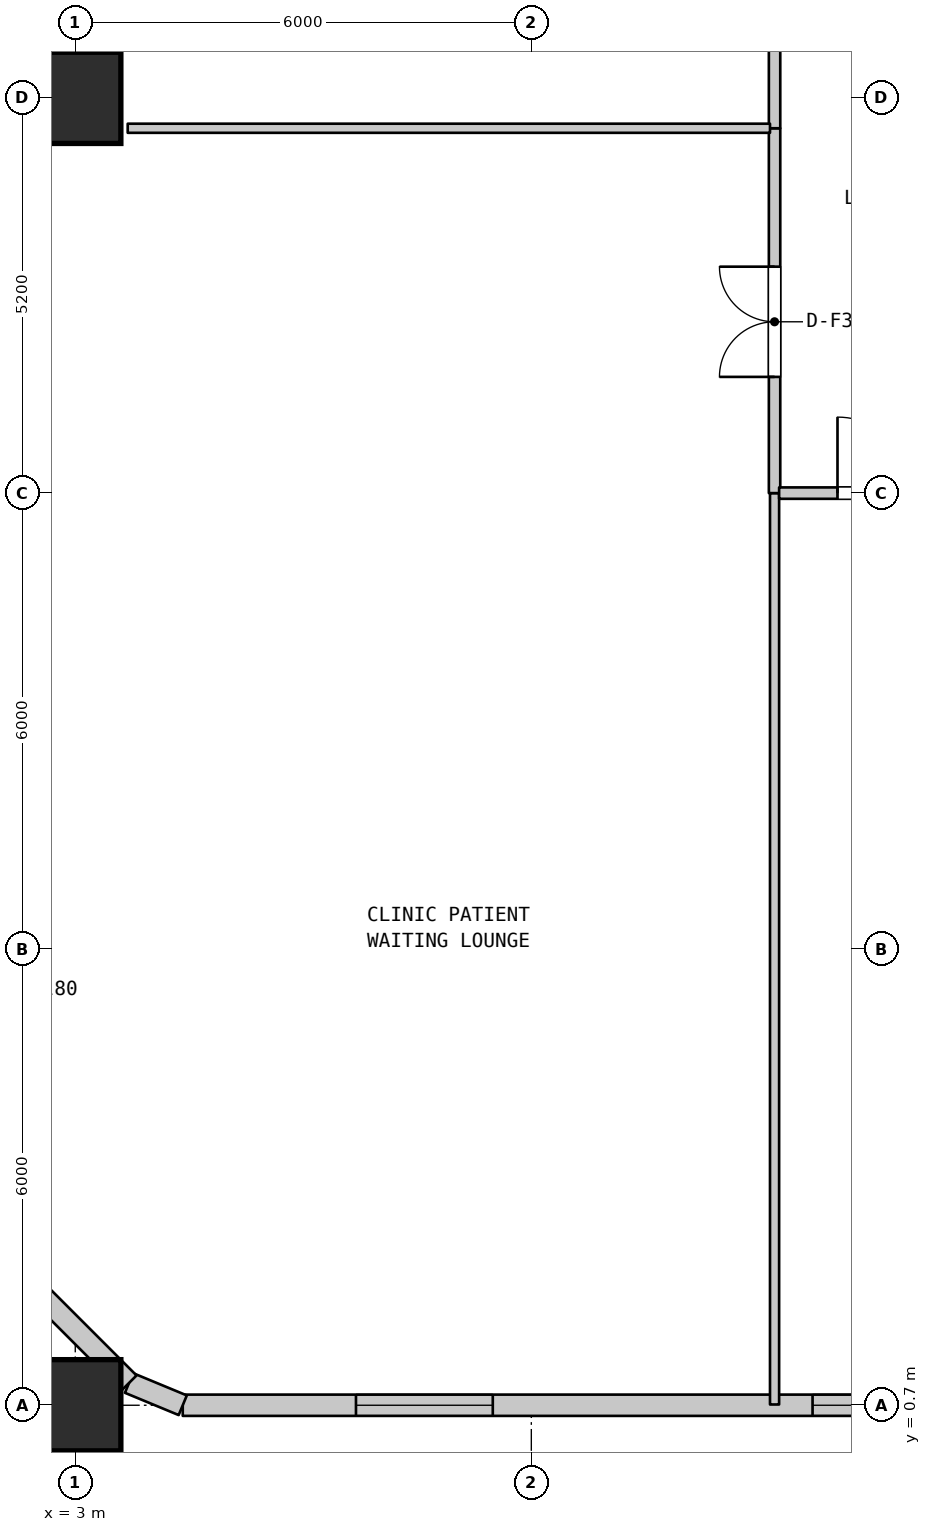
"""IFC4 building model, lengths in metres.
Left out: names, types, materials, properties, quantities, classifications, styles, units other than length and angle.
Written with IfcOpenShell. Run it as: python <this file> out.ifc"""

import sys

from ifc_helpers import new_model, si_unit, direction, frame, frame_2d, origin, origin_2d, place, context, subcontext, project, spatial, rectangle, extrude, element, fill, save


model = new_model("IFC4")
c1 = context("Model", 3, precision=1e-05, world=origin(), true_north=direction((0.0, 1.0)))
c2 = subcontext(c1, "Body", "Model", "MODEL_VIEW")
j1 = project(units=[si_unit("LENGTHUNIT", "METRE"), si_unit("PLANEANGLEUNIT", "RADIAN")], contexts=[c1])
p1 = place(None, origin())
s1 = spatial("IfcSite", under=j1, at=p1, CompositionType="ELEMENT")
p2 = place(p1, origin())
s2 = spatial("IfcBuilding", under=s1, at=p2, CompositionType="ELEMENT")
p3 = place(p2, frame((0.0, 0.0, 6.5)))
s3 = spatial("IfcBuildingStorey", under=s2, at=p3, CompositionType="ELEMENT", Elevation=6.5)
for number, where, z_axis, x_axis in (
    (1, (3.0, 0.7, 0.0), (0.0, 0.0, 1.0), (1.0, 0.0, 0.0)),
    (2, (3.0, 17.9, 0.0), (0.0, 0.0, 1.0), (1.0, 0.0, 0.0)),
):
    element("IfcColumn", number, at=place(p3, frame(where, z_axis=z_axis, x_axis=x_axis)), inside=s3, PredefinedType="PILASTER", context=c2, shape_type="SweptSolid", body=[
        extrude(rectangle(XDim=1.2, YDim=1.2, at=origin_2d()), origin(), (0.0, 0.0, 1.0), 6.5),
    ])
p4 = place(p3, frame((33.0, 0.7, 0.0), z_axis=(0.0, 0.0, 1.0), x_axis=(-1.0, 0.0, 0.0)))
e3 = element("IfcWall", 3, at=p4, inside=s3, PredefinedType="STANDARD", context=c2, shape_type="SweptSolid", body=[
    extrude(rectangle(XDim=28.586, YDim=0.28, at=frame_2d((14.293, 0.0))), origin(), (0.0, 0.0, 1.0), 6.17),
])
p5 = place(p4, frame((2.279, 0.0, 0.95)))
e4 = element("IfcOpeningElement", 4, at=p5, cuts=e3, PredefinedType="OPENING", context=c2, shape_type="SweptSolid", body=[
    extrude(rectangle(XDim=1.8, YDim=1.8, at=frame_2d((0.9, 0.9))), frame((0.0, 0.15, 0.0), z_axis=(0.0, -1.0, 0.0), x_axis=(1.0, 0.0, 0.0)), (0.0, 0.0, 1.0), 0.3),
])
p6 = place(p4, frame((7.836, 0.0, 0.95)))
e5 = element("IfcOpeningElement", 5, at=p6, cuts=e3, PredefinedType="OPENING", context=c2, shape_type="SweptSolid", body=[
    extrude(rectangle(XDim=1.8, YDim=1.8, at=frame_2d((0.9, 0.9))), frame((0.0, 0.15, 0.0), z_axis=(0.0, -1.0, 0.0), x_axis=(1.0, 0.0, 0.0)), (0.0, 0.0, 1.0), 0.3),
])
p7 = place(p4, frame((13.393, 0.0, 0.95)))
e6 = element("IfcOpeningElement", 6, at=p7, cuts=e3, PredefinedType="OPENING", context=c2, shape_type="SweptSolid", body=[
    extrude(rectangle(XDim=1.8, YDim=1.8, at=frame_2d((0.9, 0.9))), frame((0.0, 0.15, 0.0), z_axis=(0.0, -1.0, 0.0), x_axis=(1.0, 0.0, 0.0)), (0.0, 0.0, 1.0), 0.3),
])
p8 = place(p4, frame((18.5, 0.0, 0.95)))
e7 = element("IfcOpeningElement", 7, at=p8, cuts=e3, PredefinedType="OPENING", context=c2, shape_type="SweptSolid", body=[
    extrude(rectangle(XDim=1.8, YDim=1.8, at=frame_2d((0.9, 0.9))), frame((0.0, 0.15, 0.0), z_axis=(0.0, -1.0, 0.0), x_axis=(1.0, 0.0, 0.0)), (0.0, 0.0, 1.0), 0.3),
])
p9 = place(p4, frame((24.507, 0.0, 0.95)))
e8 = element("IfcOpeningElement", 8, at=p9, cuts=e3, PredefinedType="OPENING", context=c2, shape_type="SweptSolid", body=[
    extrude(rectangle(XDim=1.8, YDim=1.8, at=frame_2d((0.9, 0.9))), frame((0.0, 0.15, 0.0), z_axis=(0.0, -1.0, 0.0), x_axis=(1.0, 0.0, 0.0)), (0.0, 0.0, 1.0), 0.3),
])
p10 = place(p3, frame((4.414, 0.7, 0.0), z_axis=(0.0, 0.0, 1.0), x_axis=(-0.92383017907, 0.382802560388, 0.0)))
e9 = element("IfcWall", 9, at=p10, inside=s3, PredefinedType="STANDARD", context=c2, shape_type="SweptSolid", body=[
    extrude(rectangle(XDim=0.765, YDim=0.28, at=frame_2d((0.383, 0.0))), origin(), (0.0, 0.0, 1.0), 6.17),
])
p11 = place(p3, frame((3.707, 0.993, 0.0), z_axis=(0.0, 0.0, 1.0), x_axis=(-0.707106781187, 0.707106781187, 0.0)))
e10 = element("IfcWall", 10, at=p11, inside=s3, PredefinedType="STANDARD", context=c2, shape_type="SweptSolid", body=[
    extrude(rectangle(XDim=2.0, YDim=0.28, at=frame_2d((1.0, 0.0))), origin(), (0.0, 0.0, 1.0), 6.17),
])
p12 = place(p3, frame((12.2, 0.71, 0.0), z_axis=(0.0, 0.0, 1.0), x_axis=(0.0, 1.0, 0.0)))
e11 = element("IfcWall", 11, at=p12, inside=s3, PredefinedType="PARTITIONING", context=c2, shape_type="SweptSolid", body=[
    extrude(rectangle(XDim=11.99, YDim=0.12, at=frame_2d((5.995, 0.0))), origin(), (0.0, 0.0, 1.0), 6.17),
])
p13 = place(p3, frame((12.2, 12.7, 0.0), z_axis=(0.0, 0.0, 1.0), x_axis=(0.0, 1.0, 0.0)))
e12 = element("IfcWall", 12, at=p13, inside=s3, PredefinedType="STANDARD", context=c2, shape_type="SweptSolid", body=[
    extrude(rectangle(XDim=4.8, YDim=0.15, at=frame_2d((2.4, 0.0))), origin(), (0.0, 0.0, 1.0), 6.17),
])
p14 = place(p13, frame((1.529, 0.0, 0.0)))
e13 = element("IfcOpeningElement", 13, at=p14, cuts=e12, PredefinedType="OPENING", context=c2, shape_type="SweptSolid", body=[
    extrude(rectangle(XDim=1.45, YDim=2.2, at=frame_2d((0.725, 1.1))), frame((0.0, 0.085, 0.0), z_axis=(0.0, -1.0, 0.0), x_axis=(1.0, 0.0, 0.0)), (0.0, 0.0, 1.0), 0.17),
])
p15 = place(p3, frame((12.2, 17.5, 0.0), z_axis=(0.0, 0.0, 1.0), x_axis=(0.0, 1.0, 0.0)))
e14 = element("IfcWall", 14, at=p15, inside=s3, PredefinedType="STANDARD", context=c2, shape_type="SweptSolid", body=[
    extrude(rectangle(XDim=6.7, YDim=0.15, at=frame_2d((3.35, 0.0))), origin(), (0.0, 0.0, 1.0), 6.17),
])
p16 = place(p15, frame((2.829, 0.0, 0.0)))
e15 = element("IfcOpeningElement", 15, at=p16, cuts=e14, PredefinedType="OPENING", context=c2, shape_type="SweptSolid", body=[
    extrude(rectangle(XDim=1.0, YDim=2.15, at=frame_2d((0.5, 1.075))), frame((0.0, 0.085, 0.0), z_axis=(0.0, -1.0, 0.0), x_axis=(1.0, 0.0, 0.0)), (0.0, 0.0, 1.0), 0.17),
])
p17 = place(p3, frame((12.26, 12.7, 0.0), z_axis=(0.0, 0.0, 1.0), x_axis=(1.0, 0.0, 0.0)))
e16 = element("IfcWall", 16, at=p17, inside=s3, PredefinedType="STANDARD", context=c2, shape_type="SweptSolid", body=[
    extrude(rectangle(XDim=2.68, YDim=0.15, at=frame_2d((1.34, 0.0))), origin(), (0.0, 0.0, 1.0), 6.17),
])
p18 = place(p17, frame((0.768, 0.0, 0.0)))
e17 = element("IfcOpeningElement", 17, at=p18, cuts=e16, PredefinedType="OPENING", context=c2, shape_type="SweptSolid", body=[
    extrude(rectangle(XDim=1.0, YDim=2.15, at=frame_2d((0.5, 1.075))), frame((0.0, 0.085, 0.0), z_axis=(0.0, -1.0, 0.0), x_axis=(1.0, 0.0, 0.0)), (0.0, 0.0, 1.0), 0.17),
])
p19 = place(p3, frame((3.69, 17.5, 0.0), z_axis=(0.0, 0.0, 1.0), x_axis=(1.0, 0.0, 0.0)))
e18 = element("IfcWall", 18, at=p19, inside=s3, PredefinedType="PARTITIONING", context=c2, shape_type="SweptSolid", body=[
    extrude(rectangle(XDim=8.45, YDim=0.12, at=frame_2d((4.225, 0.0))), origin(), (0.0, 0.0, 1.0), 6.17),
])
p20 = place(p8, origin())
e19 = element("IfcWindow", 19, at=p20, inside=s3, PartitioningType="DOUBLE_PANEL_VERTICAL", PredefinedType="WINDOW", context=c2, shape_type="SweptSolid", body=[
    extrude(rectangle(XDim=1.8, YDim=1.8, at=frame_2d((0.9, 0.9))), frame((0.0, 0.03, 0.0), z_axis=(0.0, -1.0, 0.0), x_axis=(1.0, 0.0, 0.0)), (0.0, 0.0, 1.0), 0.06),
])
fill(e7, e19)
p21 = place(p9, origin())
e20 = element("IfcWindow", 20, at=p21, inside=s3, PartitioningType="DOUBLE_PANEL_VERTICAL", PredefinedType="WINDOW", context=c2, shape_type="SweptSolid", body=[
    extrude(rectangle(XDim=1.8, YDim=1.8, at=frame_2d((0.9, 0.9))), frame((0.0, 0.03, 0.0), z_axis=(0.0, -1.0, 0.0), x_axis=(1.0, 0.0, 0.0)), (0.0, 0.0, 1.0), 0.06),
])
fill(e8, e20)
p22 = place(p14, origin())
e21 = element("IfcDoor", 21, at=p22, inside=s3, OperationType="DOUBLE_DOOR_SINGLE_SWING", PredefinedType="DOOR", context=c2, shape_type="SweptSolid", body=[
    extrude(rectangle(XDim=1.45, YDim=2.2, at=frame_2d((0.725, 1.1))), frame((0.0, 0.025, 0.0), z_axis=(0.0, -1.0, 0.0), x_axis=(1.0, 0.0, 0.0)), (0.0, 0.0, 1.0), 0.05),
])
fill(e13, e21)
p23 = place(p18, origin())
e22 = element("IfcDoor", 22, at=p23, inside=s3, OperationType="SINGLE_SWING_LEFT", PredefinedType="DOOR", context=c2, shape_type="SweptSolid", body=[
    extrude(rectangle(XDim=1.0, YDim=2.15, at=frame_2d((0.5, 1.075))), frame((0.0, 0.025, 0.0), z_axis=(0.0, -1.0, 0.0), x_axis=(1.0, 0.0, 0.0)), (0.0, 0.0, 1.0), 0.05),
])
fill(e17, e22)
save(model, sys.argv[1])
